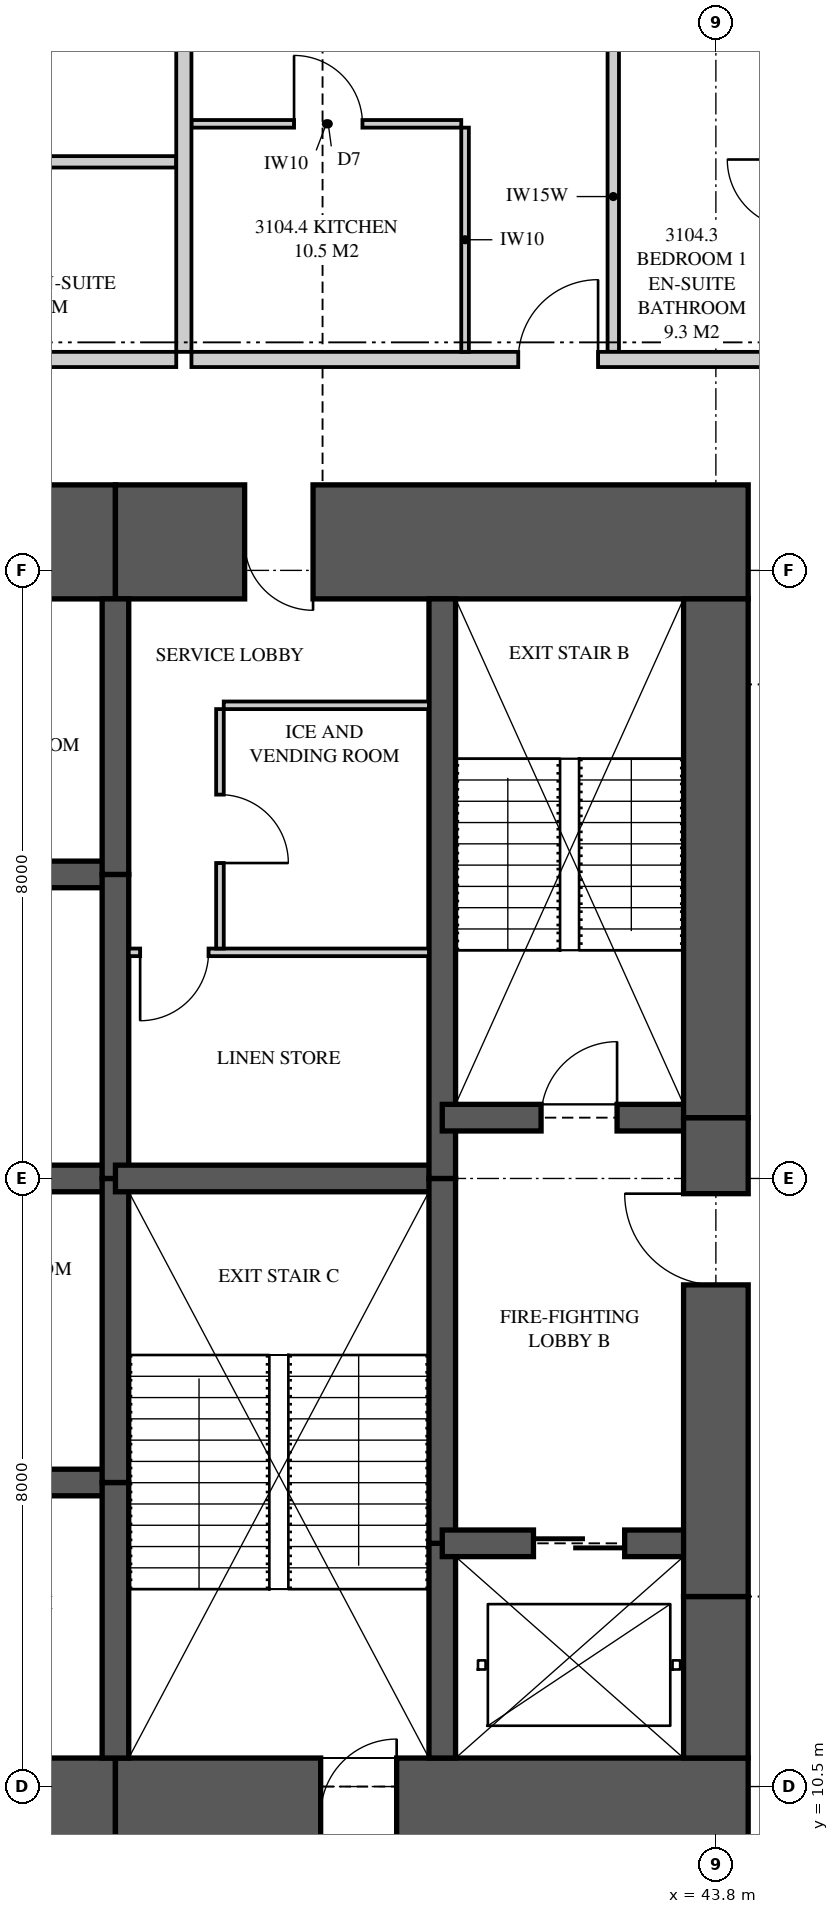
"""IFC4 building model, lengths in metres.
Left out: names, types, materials, properties, quantities, classifications, styles, units other than length and angle.
Written with IfcOpenShell. Run it as: python <this file> out.ifc"""

import sys

from ifc_helpers import new_model, si_unit, direction, frame, frame_2d, origin, place, context, subcontext, project, spatial, polyline, rectangle, outline, extrude, element, fill, save


model = new_model("IFC4")
c1 = context("Model", 3, precision=1e-05, world=origin(), true_north=direction((0.0, 1.0)))
c2 = subcontext(c1, "Body", "Model", "MODEL_VIEW")
j1 = project(units=[si_unit("LENGTHUNIT", "METRE"), si_unit("PLANEANGLEUNIT", "RADIAN")], contexts=[c1])
p1 = place(None, origin())
s1 = spatial("IfcSite", under=j1, at=p1, CompositionType="ELEMENT")
p2 = place(p1, origin())
s2 = spatial("IfcBuilding", under=s1, at=p2, CompositionType="ELEMENT")
p3 = place(p2, frame((0.0, 0.0, 114.9)))
s3 = spatial("IfcBuildingStorey", under=s2, at=p3, CompositionType="ELEMENT", Elevation=114.9)
p4 = place(p3, frame((31.6, 10.125, 0.0), z_axis=(0.0, 0.0, 1.0), x_axis=(1.0, 0.0, 0.0)))
e1 = element("IfcWall", 1, at=p4, inside=s3, PredefinedType="SHEAR", context=c2, shape_type="SweptSolid", body=[
    extrude(rectangle(XDim=4.3, YDim=1.5, at=frame_2d((2.15, 0.0))), origin(), (0.0, 0.0, 1.0), 3.35),
])
p5 = place(p3, frame((35.9, 10.125, 0.0), z_axis=(0.0, 0.0, 1.0), x_axis=(1.0, 0.0, 0.0)))
e2 = element("IfcWall", 2, at=p5, inside=s3, PredefinedType="SHEAR", context=c2, shape_type="SweptSolid", body=[
    extrude(rectangle(XDim=8.325, YDim=1.5, at=frame_2d((4.163, 0.0))), origin(), (0.0, 0.0, 1.0), 3.35),
])
p6 = place(p5, frame((2.7, 0.0, 0.0)))
e3 = element("IfcOpeningElement", 3, at=p6, cuts=e2, PredefinedType="OPENING", context=c2, shape_type="SweptSolid", body=[
    extrude(rectangle(XDim=1.0, YDim=2.1, at=frame_2d((0.5, 1.05))), frame((0.0, 0.76, 0.0), z_axis=(0.0, -1.0, 0.0), x_axis=(1.0, 0.0, 0.0)), (0.0, 0.0, 1.0), 1.52),
])
p7 = place(p3, frame((44.225, 26.875, 0.0), z_axis=(0.0, 0.0, 1.0), x_axis=(-1.0, 0.0, 0.0)))
e4 = element("IfcWall", 4, at=p7, inside=s3, PredefinedType="SHEAR", context=c2, shape_type="SweptSolid", body=[
    extrude(rectangle(XDim=8.325, YDim=1.5, at=frame_2d((4.163, 0.0))), origin(), (0.0, 0.0, 1.0), 3.35),
])
p8 = place(p7, frame((5.725, 0.0, 0.0)))
e5 = element("IfcOpeningElement", 5, at=p8, cuts=e4, PredefinedType="OPENING", context=c2, shape_type="SweptSolid", body=[
    extrude(rectangle(XDim=0.9, YDim=2.1, at=frame_2d((0.45, 1.05))), frame((0.0, 0.76, 0.0), z_axis=(0.0, -1.0, 0.0), x_axis=(1.0, 0.0, 0.0)), (0.0, 0.0, 1.0), 1.52),
])
p9 = place(p3, frame((35.9, 26.875, 0.0), z_axis=(0.0, 0.0, 1.0), x_axis=(-1.0, 0.0, 0.0)))
e6 = element("IfcWall", 6, at=p9, inside=s3, PredefinedType="SHEAR", context=c2, shape_type="SweptSolid", body=[
    extrude(rectangle(XDim=4.3, YDim=1.5, at=frame_2d((2.15, 0.0))), origin(), (0.0, 0.0, 1.0), 3.35),
])
p10 = place(p3, frame((43.8, 10.875, 0.0), z_axis=(0.0, 0.0, 1.0), x_axis=(0.0, 1.0, 0.0)))
e7 = element("IfcWall", 7, at=p10, inside=s3, PredefinedType="SHEAR", context=c2, shape_type="SweptSolid", body=[
    extrude(rectangle(XDim=2.125, YDim=0.85, at=frame_2d((1.062, 0.0))), origin(), (0.0, 0.0, 1.0), 3.35),
])
p11 = place(p3, frame((43.8, 13.0, 0.0), z_axis=(0.0, 0.0, 1.0), x_axis=(0.0, 1.0, 0.0)))
e8 = element("IfcWall", 8, at=p11, inside=s3, PredefinedType="SHEAR", context=c2, shape_type="SweptSolid", body=[
    extrude(rectangle(XDim=6.3, YDim=0.85, at=frame_2d((3.15, 0.0))), origin(), (0.0, 0.0, 1.0), 3.35),
])
p12 = place(p11, frame((4.1, 0.0, 0.0)))
e9 = element("IfcOpeningElement", 9, at=p12, cuts=e8, PredefinedType="OPENING", context=c2, shape_type="SweptSolid", body=[
    extrude(rectangle(XDim=1.2, YDim=2.2, at=frame_2d((0.6, 1.1))), frame((0.0, 0.435, 0.0), z_axis=(0.0, -1.0, 0.0), x_axis=(1.0, 0.0, 0.0)), (0.0, 0.0, 1.0), 0.87),
])
p13 = place(p3, frame((43.8, 19.3, 0.0), z_axis=(0.0, 0.0, 1.0), x_axis=(0.0, 1.0, 0.0)))
e10 = element("IfcWall", 10, at=p13, inside=s3, PredefinedType="SHEAR", context=c2, shape_type="SweptSolid", body=[
    extrude(rectangle(XDim=6.825, YDim=0.85, at=frame_2d((3.413, 0.0))), origin(), (0.0, 0.0, 1.0), 3.35),
])
p14 = place(p3, frame((35.9, 10.875, 0.0), z_axis=(0.0, 0.0, 1.0), x_axis=(0.0, 1.0, 0.0)))
e11 = element("IfcWall", 11, at=p14, inside=s3, PredefinedType="SHEAR", context=c2, shape_type="SweptSolid", body=[
    extrude(rectangle(XDim=3.625, YDim=0.35, at=frame_2d((1.812, 0.0))), origin(), (0.0, 0.0, 1.0), 3.35),
])
for number, where, z_axis, x_axis in (
    (12, (35.9, 14.5, 0.0), (0.0, 0.0, 1.0), (0.0, 1.0, 0.0)),
    (13, (35.9, 18.5, 0.0), (0.0, 0.0, 1.0), (0.0, 1.0, 0.0)),
):
    element("IfcWall", number, at=place(p3, frame(where, z_axis=z_axis, x_axis=x_axis)), inside=s3, PredefinedType="SHEAR", context=c2, shape_type="SweptSolid", body=[
        extrude(rectangle(XDim=4.0, YDim=0.35, at=frame_2d((2.0, 0.0))), origin(), (0.0, 0.0, 1.0), 3.35),
    ])
p15 = place(p3, frame((35.9, 22.5, 0.0), z_axis=(0.0, 0.0, 1.0), x_axis=(0.0, 1.0, 0.0)))
e14 = element("IfcWall", 14, at=p15, inside=s3, PredefinedType="SHEAR", context=c2, shape_type="SweptSolid", body=[
    extrude(rectangle(XDim=3.625, YDim=0.35, at=frame_2d((1.812, 0.0))), origin(), (0.0, 0.0, 1.0), 3.35),
])
p16 = place(p3, frame((40.2, 10.875, 0.0), z_axis=(0.0, 0.0, 1.0), x_axis=(0.0, 1.0, 0.0)))
e15 = element("IfcWall", 15, at=p16, inside=s3, PredefinedType="SHEAR", context=c2, shape_type="SweptSolid", body=[
    extrude(rectangle(XDim=2.825, YDim=0.35, at=frame_2d((1.413, 0.0))), origin(), (0.0, 0.0, 1.0), 3.35),
])
p17 = place(p3, frame((40.2, 13.7, 0.0), z_axis=(0.0, 0.0, 1.0), x_axis=(0.0, 1.0, 0.0)))
e16 = element("IfcWall", 16, at=p17, inside=s3, PredefinedType="SHEAR", context=c2, shape_type="SweptSolid", body=[
    extrude(rectangle(XDim=4.8, YDim=0.35, at=frame_2d((2.4, 0.0))), origin(), (0.0, 0.0, 1.0), 3.35),
])
p18 = place(p3, frame((40.2, 18.5, 0.0), z_axis=(0.0, 0.0, 1.0), x_axis=(0.0, 1.0, 0.0)))
e17 = element("IfcWall", 17, at=p18, inside=s3, PredefinedType="SHEAR", context=c2, shape_type="SweptSolid", body=[
    extrude(rectangle(XDim=7.625, YDim=0.35, at=frame_2d((3.812, 0.0))), origin(), (0.0, 0.0, 1.0), 3.35),
])
for number, where, z_axis, x_axis in (
    (18, (31.6, 14.5, 0.0), (0.0, 0.0, 1.0), (1.0, 0.0, 0.0)),
    (19, (31.6, 18.5, 0.0), (0.0, 0.0, 1.0), (1.0, 0.0, 0.0)),
    (20, (31.6, 22.5, 0.0), (0.0, 0.0, 1.0), (1.0, 0.0, 0.0)),
):
    element("IfcWall", number, at=place(p3, frame(where, z_axis=z_axis, x_axis=x_axis)), inside=s3, PredefinedType="SHEAR", context=c2, shape_type="SweptSolid", body=[
        extrude(rectangle(XDim=4.3, YDim=0.35, at=frame_2d((2.15, 0.0))), origin(), (0.0, 0.0, 1.0), 3.35),
    ])
p19 = place(p3, frame((35.9, 18.5, 0.0), z_axis=(0.0, 0.0, 1.0), x_axis=(1.0, 0.0, 0.0)))
e21 = element("IfcWall", 21, at=p19, inside=s3, PredefinedType="SHEAR", context=c2, shape_type="SweptSolid", body=[
    extrude(rectangle(XDim=4.3, YDim=0.35, at=frame_2d((2.15, 0.0))), origin(), (0.0, 0.0, 1.0), 3.35),
])
p20 = place(p3, frame((40.2, 13.7, 0.0), z_axis=(0.0, 0.0, 1.0), x_axis=(1.0, 0.0, 0.0)))
e22 = element("IfcWall", 22, at=p20, inside=s3, PredefinedType="SHEAR", context=c2, shape_type="SweptSolid", body=[
    extrude(rectangle(XDim=3.6, YDim=0.35, at=frame_2d((1.8, 0.0))), origin(), (0.0, 0.0, 1.0), 3.35),
])
p21 = place(p20, frame((1.2, 0.0, 0.0)))
e23 = element("IfcOpeningElement", 23, at=p21, cuts=e22, PredefinedType="OPENING", context=c2, shape_type="SweptSolid", body=[
    extrude(rectangle(XDim=1.2, YDim=2.1, at=frame_2d((0.6, 1.05))), frame((0.0, 0.185, 0.0), z_axis=(0.0, -1.0, 0.0), x_axis=(1.0, 0.0, 0.0)), (0.0, 0.0, 1.0), 0.37),
])
p22 = place(p3, frame((40.2, 19.3, 0.0), z_axis=(0.0, 0.0, 1.0), x_axis=(1.0, 0.0, 0.0)))
e24 = element("IfcWall", 24, at=p22, inside=s3, PredefinedType="SHEAR", context=c2, shape_type="SweptSolid", body=[
    extrude(rectangle(XDim=3.6, YDim=0.35, at=frame_2d((1.8, 0.0))), origin(), (0.0, 0.0, 1.0), 3.35),
])
p23 = place(p22, frame((1.3, 0.0, 0.0)))
e25 = element("IfcOpeningElement", 25, at=p23, cuts=e24, PredefinedType="OPENING", context=c2, shape_type="SweptSolid", body=[
    extrude(rectangle(XDim=1.0, YDim=2.1, at=frame_2d((0.5, 1.05))), frame((0.0, 0.185, 0.0), z_axis=(0.0, -1.0, 0.0), x_axis=(1.0, 0.0, 0.0)), (0.0, 0.0, 1.0), 0.37),
])
p24 = place(p3, frame((36.8, 37.825, 0.0), z_axis=(0.0, 0.0, 1.0), x_axis=(0.0, -1.0, 0.0)))
e26 = element("IfcWall", 26, at=p24, inside=s3, PredefinedType="PARTITIONING", context=c2, shape_type="SweptSolid", body=[
    extrude(outline(polyline([(0.529, 2.15), (0.0, 2.15), (0.0, 0.0), (0.529, 0.0), (0.529, 0.257), (1.021, 0.257), (1.021, 0.0), (8.45, 0.0), (8.45, 3.11), (1.685, 3.11), (1.685, 2.15), (1.021, 2.15), (1.021, 1.894), (0.529, 1.894), (0.529, 2.15)])), frame((0.0, 0.1, 0.0), z_axis=(0.0, -1.0, 0.0), x_axis=(1.0, 0.0, 0.0)), (0.0, 0.0, 1.0), 0.2),
])
p25 = place(p3, frame((17.775, 29.275, 0.0), z_axis=(0.0, 0.0, 1.0), x_axis=(1.0, 0.0, 0.0)))
e27 = element("IfcWall", 27, at=p25, inside=s3, PredefinedType="PARTITIONING", context=c2, shape_type="SweptSolid", body=[
    extrude(outline(polyline([(0.0, 0.0), (18.925, 0.0), (18.925, 3.11), (10.312, 3.11), (10.312, 2.541), (9.638, 2.541), (9.638, 3.11), (0.0, 3.11), (0.0, 0.0)])), frame((0.0, 0.1, 0.0), z_axis=(0.0, -1.0, 0.0), x_axis=(1.0, 0.0, 0.0)), (0.0, 0.0, 1.0), 0.2),
])
p26 = place(p25, frame((3.125, 0.0, 0.0)))
e28 = element("IfcOpeningElement", 28, at=p26, cuts=e27, PredefinedType="OPENING", context=c2, shape_type="SweptSolid", body=[
    extrude(rectangle(XDim=1.05, YDim=2.2, at=frame_2d((0.525, 1.1))), frame((0.0, 0.11, 0.0), z_axis=(0.0, -1.0, 0.0), x_axis=(1.0, 0.0, 0.0)), (0.0, 0.0, 1.0), 0.22),
])
p27 = place(p3, frame((32.95, 31.875, 0.0), z_axis=(0.0, 0.0, 1.0), x_axis=(1.0, 0.0, 0.0)))
e29 = element("IfcWall", 29, at=p27, inside=s3, PredefinedType="PLUMBINGWALL", context=c2, shape_type="SweptSolid", body=[
    extrude(rectangle(XDim=3.75, YDim=0.15, at=frame_2d((1.875, 0.0))), origin(), (0.0, 0.0, 1.0), 3.11),
])
p28 = place(p27, frame((0.4, 0.0, 0.0)))
e30 = element("IfcOpeningElement", 30, at=p28, cuts=e29, PredefinedType="OPENING", context=c2, shape_type="SweptSolid", body=[
    extrude(rectangle(XDim=0.9, YDim=2.1, at=frame_2d((0.45, 1.05))), frame((0.0, 0.085, 0.0), z_axis=(0.0, -1.0, 0.0), x_axis=(1.0, 0.0, 0.0)), (0.0, 0.0, 1.0), 0.17),
])
p29 = place(p3, frame((36.9, 29.275, 0.0), z_axis=(0.0, 0.0, 1.0), x_axis=(1.0, 0.0, 0.0)))
e31 = element("IfcWall", 31, at=p29, inside=s3, PredefinedType="PARTITIONING", context=c2, shape_type="SweptSolid", body=[
    extrude(outline(polyline([(0.0, 0.0), (9.125, 0.0), (9.125, 3.11), (2.062, 3.11), (2.062, 2.541), (1.388, 2.541), (1.388, 3.11), (0.0, 3.11), (0.0, 0.0)])), frame((0.0, 0.1, 0.0), z_axis=(0.0, -1.0, 0.0), x_axis=(1.0, 0.0, 0.0)), (0.0, 0.0, 1.0), 0.2),
])
p30 = place(p29, frame((4.3, 0.0, 0.0)))
e32 = element("IfcOpeningElement", 32, at=p30, cuts=e31, PredefinedType="OPENING", context=c2, shape_type="SweptSolid", body=[
    extrude(rectangle(XDim=1.05, YDim=2.2, at=frame_2d((0.525, 1.1))), frame((0.0, 0.11, 0.0), z_axis=(0.0, -1.0, 0.0), x_axis=(1.0, 0.0, 0.0)), (0.0, 0.0, 1.0), 0.22),
])
p31 = place(p3, frame((42.45, 33.461, 0.0), z_axis=(0.0, 0.0, 1.0), x_axis=(0.0, -1.0, 0.0)))
e33 = element("IfcWall", 33, at=p31, inside=s3, PredefinedType="PLUMBINGWALL", context=c2, shape_type="SweptSolid", body=[
    extrude(rectangle(XDim=4.086, YDim=0.15, at=frame_2d((2.043, 0.0))), origin(), (0.0, 0.0, 1.0), 3.11),
])
p32 = place(p3, frame((36.9, 32.375, 0.0), z_axis=(0.0, 0.0, 1.0), x_axis=(1.0, 0.0, 0.0)))
e34 = element("IfcWall", 34, at=p32, inside=s3, PredefinedType="PARTITIONING", context=c2, shape_type="SweptSolid", body=[
    extrude(outline(polyline([(0.0, 0.0), (3.55, 0.0), (3.55, 3.11), (2.012, 3.11), (2.012, 2.541), (1.438, 2.541), (1.438, 3.11), (0.0, 3.11), (0.0, 0.0)])), frame((0.0, 0.05, 0.0), z_axis=(0.0, -1.0, 0.0), x_axis=(1.0, 0.0, 0.0)), (0.0, 0.0, 1.0), 0.1),
])
p33 = place(p32, frame((1.35, 0.0, 0.0)))
e35 = element("IfcOpeningElement", 35, at=p33, cuts=e34, PredefinedType="OPENING", context=c2, shape_type="SweptSolid", body=[
    extrude(rectangle(XDim=0.9, YDim=2.1, at=frame_2d((0.45, 1.05))), frame((0.0, 0.06, 0.0), z_axis=(0.0, -1.0, 0.0), x_axis=(1.0, 0.0, 0.0)), (0.0, 0.0, 1.0), 0.12),
])
p34 = place(p3, frame((40.5, 32.325, 0.0), z_axis=(0.0, 0.0, 1.0), x_axis=(0.0, -1.0, 0.0)))
e36 = element("IfcWall", 36, at=p34, inside=s3, PredefinedType="PARTITIONING", context=c2, shape_type="SweptSolid", body=[
    extrude(rectangle(XDim=2.95, YDim=0.1, at=frame_2d((1.475, 0.0))), origin(), (0.0, 0.0, 1.0), 3.11),
])
p35 = place(p3, frame((37.325, 24.725, 0.0), z_axis=(0.0, 0.0, 1.0), x_axis=(1.0, 0.0, 0.0)))
e37 = element("IfcWall", 37, at=p35, inside=s3, PredefinedType="PARTITIONING", context=c2, shape_type="SweptSolid", body=[
    extrude(rectangle(XDim=2.7, YDim=0.1, at=frame_2d((1.35, 0.0))), origin(), (0.0, 0.0, 1.0), 3.11),
])
p36 = place(p3, frame((37.275, 21.525, 0.0), z_axis=(0.0, 0.0, 1.0), x_axis=(0.0, 1.0, 0.0)))
e38 = element("IfcWall", 38, at=p36, inside=s3, PredefinedType="PARTITIONING", context=c2, shape_type="SweptSolid", body=[
    extrude(rectangle(XDim=3.15, YDim=0.1, at=frame_2d((1.575, 0.0))), origin(), (0.0, 0.0, 1.0), 3.11),
])
p37 = place(p36, frame((1.125, 0.0, 0.0)))
e39 = element("IfcOpeningElement", 39, at=p37, cuts=e38, PredefinedType="OPENING", context=c2, shape_type="SweptSolid", body=[
    extrude(rectangle(XDim=0.9, YDim=2.1, at=frame_2d((0.45, 1.05))), frame((0.0, 0.06, 0.0), z_axis=(0.0, -1.0, 0.0), x_axis=(1.0, 0.0, 0.0)), (0.0, 0.0, 1.0), 0.12),
])
p38 = place(p3, frame((36.075, 21.475, 0.0), z_axis=(0.0, 0.0, 1.0), x_axis=(1.0, 0.0, 0.0)))
e40 = element("IfcWall", 40, at=p38, inside=s3, PredefinedType="PARTITIONING", context=c2, shape_type="SweptSolid", body=[
    extrude(rectangle(XDim=3.95, YDim=0.1, at=frame_2d((1.975, 0.0))), origin(), (0.0, 0.0, 1.0), 3.11),
])
p39 = place(p38, frame((0.15, 0.0, 0.0)))
e41 = element("IfcOpeningElement", 41, at=p39, cuts=e40, PredefinedType="OPENING", context=c2, shape_type="SweptSolid", body=[
    extrude(rectangle(XDim=0.9, YDim=2.1, at=frame_2d((0.45, 1.05))), frame((0.0, 0.06, 0.0), z_axis=(0.0, -1.0, 0.0), x_axis=(1.0, 0.0, 0.0)), (0.0, 0.0, 1.0), 0.12),
])
p40 = place(p30, origin())
e42 = element("IfcDoor", 42, at=p40, inside=s3, OperationType="SINGLE_SWING_RIGHT", PredefinedType="DOOR", context=c2, shape_type="SweptSolid", body=[
    extrude(rectangle(XDim=1.05, YDim=2.2, at=frame_2d((0.525, 1.1))), frame((0.0, 0.025, 0.0), z_axis=(0.0, -1.0, 0.0), x_axis=(1.0, 0.0, 0.0)), (0.0, 0.0, 1.0), 0.05),
])
fill(e32, e42)
p41 = place(p33, origin())
e43 = element("IfcDoor", 43, at=p41, inside=s3, OperationType="SINGLE_SWING_LEFT", PredefinedType="DOOR", context=c2, shape_type="SweptSolid", body=[
    extrude(rectangle(XDim=0.9, YDim=2.1, at=frame_2d((0.45, 1.05))), frame((0.0, 0.025, 0.0), z_axis=(0.0, -1.0, 0.0), x_axis=(1.0, 0.0, 0.0)), (0.0, 0.0, 1.0), 0.05),
])
fill(e35, e43)
p42 = place(p37, frame((0.9, 0.0, 0.0), z_axis=(0.0, 0.0, 1.0), x_axis=(-1.0, 0.0, 0.0)))
e44 = element("IfcDoor", 44, at=p42, inside=s3, OperationType="SINGLE_SWING_RIGHT", PredefinedType="DOOR", context=c2, shape_type="SweptSolid", body=[
    extrude(rectangle(XDim=0.9, YDim=2.1, at=frame_2d((0.45, 1.05))), frame((0.0, 0.025, 0.0), z_axis=(0.0, -1.0, 0.0), x_axis=(1.0, 0.0, 0.0)), (0.0, 0.0, 1.0), 0.05),
])
fill(e39, e44)
p43 = place(p39, frame((0.9, 0.0, 0.0), z_axis=(0.0, 0.0, 1.0), x_axis=(-1.0, 0.0, 0.0)))
e45 = element("IfcDoor", 45, at=p43, inside=s3, OperationType="SINGLE_SWING_RIGHT", PredefinedType="DOOR", context=c2, shape_type="SweptSolid", body=[
    extrude(rectangle(XDim=0.9, YDim=2.1, at=frame_2d((0.45, 1.05))), frame((0.0, 0.025, 0.0), z_axis=(0.0, -1.0, 0.0), x_axis=(1.0, 0.0, 0.0)), (0.0, 0.0, 1.0), 0.05),
])
fill(e41, e45)
p44 = place(p23, origin())
e46 = element("IfcDoor", 46, at=p44, inside=s3, OperationType="SINGLE_SWING_RIGHT", PredefinedType="DOOR", context=c2, shape_type="SweptSolid", body=[
    extrude(rectangle(XDim=1.0, YDim=2.1, at=frame_2d((0.5, 1.05))), frame((0.0, 0.025, 0.0), z_axis=(0.0, -1.0, 0.0), x_axis=(1.0, 0.0, 0.0)), (0.0, 0.0, 1.0), 0.05),
])
fill(e25, e46)
p45 = place(p12, origin())
e47 = element("IfcDoor", 47, at=p45, inside=s3, OperationType="SINGLE_SWING_RIGHT", PredefinedType="DOOR", context=c2, shape_type="SweptSolid", body=[
    extrude(rectangle(XDim=1.2, YDim=2.2, at=frame_2d((0.6, 1.1))), frame((0.0, 0.025, 0.0), z_axis=(0.0, -1.0, 0.0), x_axis=(1.0, 0.0, 0.0)), (0.0, 0.0, 1.0), 0.05),
])
fill(e9, e47)
p46 = place(p21, origin())
e48 = element("IfcDoor", 48, at=p46, inside=s3, OperationType="SLIDING_TO_LEFT", PredefinedType="DOOR", context=c2, shape_type="SweptSolid", body=[
    extrude(rectangle(XDim=1.2, YDim=2.1, at=frame_2d((0.6, 1.05))), frame((0.0, 0.025, 0.0), z_axis=(0.0, -1.0, 0.0), x_axis=(1.0, 0.0, 0.0)), (0.0, 0.0, 1.0), 0.05),
])
fill(e23, e48)
p47 = place(p6, origin())
e49 = element("IfcDoor", 49, at=p47, inside=s3, OperationType="SINGLE_SWING_RIGHT", PredefinedType="DOOR", context=c2, shape_type="SweptSolid", body=[
    extrude(rectangle(XDim=1.0, YDim=2.1, at=frame_2d((0.5, 1.05))), frame((0.0, 0.025, 0.0), z_axis=(0.0, -1.0, 0.0), x_axis=(1.0, 0.0, 0.0)), (0.0, 0.0, 1.0), 0.05),
])
fill(e3, e49)
p48 = place(p8, origin())
e50 = element("IfcDoor", 50, at=p48, inside=s3, OperationType="SINGLE_SWING_LEFT", PredefinedType="DOOR", context=c2, shape_type="SweptSolid", body=[
    extrude(rectangle(XDim=0.9, YDim=2.1, at=frame_2d((0.45, 1.05))), frame((0.0, 0.47, 0.0), z_axis=(0.0, -1.0, 0.0), x_axis=(1.0, 0.0, 0.0)), (0.0, 0.0, 1.0), 0.8),
])
fill(e5, e50)
save(model, sys.argv[1])
